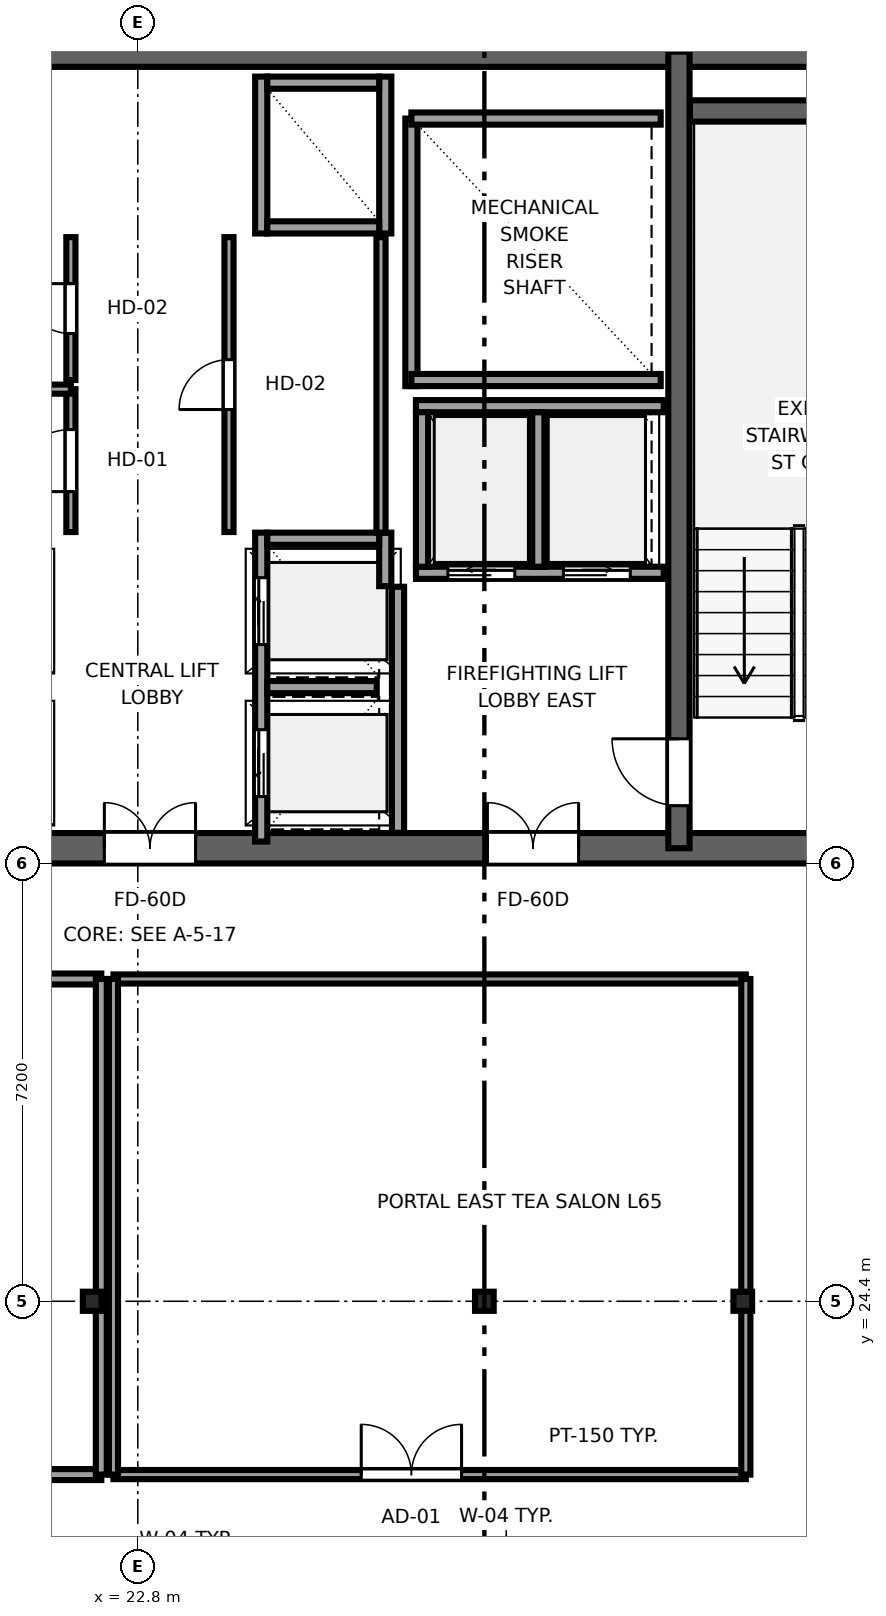
"""IFC4 building model, lengths in metres.
Left out: names, types, materials, properties, quantities, classifications, styles, units other than length and angle.
Written with IfcOpenShell. Run it as: python <this file> out.ifc"""

import sys

from ifc_helpers import new_model, si_unit, direction, frame, frame_2d, origin, origin_2d, place, context, subcontext, project, spatial, rectangle, i_section, extrude, source, transform, mapped, element, fill, save


model = new_model("IFC4")
c1 = context("Model", 3, precision=1e-05, world=origin(), true_north=direction((0.0, 1.0)))
c2 = subcontext(c1, "Body", "Model", "MODEL_VIEW")
j1 = project(units=[si_unit("LENGTHUNIT", "METRE"), si_unit("PLANEANGLEUNIT", "RADIAN")], contexts=[c1])
p1 = place(None, origin())
s1 = spatial("IfcSite", under=j1, at=p1, CompositionType="ELEMENT")
p2 = place(p1, origin())
s2 = spatial("IfcBuilding", under=s1, at=p2, CompositionType="ELEMENT")
p3 = place(p2, frame((0.0, 0.0, 245.2)))
s3 = spatial("IfcBuildingStorey", under=s2, at=p3, CompositionType="ELEMENT", Elevation=245.2)
p4 = place(p3, frame((10.0, 31.85, 0.0), z_axis=(0.0, 0.0, 1.0), x_axis=(1.0, 0.0, 0.0)))
e1 = element("IfcWall", 1, at=p4, inside=s3, PredefinedType="SHEAR", context=c2, shape_type="SweptSolid", body=[
    extrude(rectangle(XDim=26.0, YDim=0.5, at=frame_2d((13.0, 0.0))), origin(), (0.0, 0.0, 1.0), 3.55),
])
p5 = place(p4, frame((7.45, 0.0, 0.0), z_axis=(0.0, 0.0, 1.0), x_axis=(-1.0, 0.0, 0.0)))
e2 = element("IfcOpeningElement", 2, at=p5, cuts=e1, PredefinedType="OPENING", context=c2, shape_type="SweptSolid", body=[
    extrude(rectangle(XDim=1.5, YDim=2.04, at=frame_2d((0.75, 1.02))), frame((0.0, 0.26, 0.0), z_axis=(0.0, -1.0, 0.0), x_axis=(1.0, 0.0, 0.0)), (0.0, 0.0, 1.0), 0.52),
])
p6 = place(p4, frame((13.75, 0.0, 0.0), z_axis=(0.0, 0.0, 1.0), x_axis=(-1.0, 0.0, 0.0)))
e3 = element("IfcOpeningElement", 3, at=p6, cuts=e1, PredefinedType="OPENING", context=c2, shape_type="SweptSolid", body=[
    extrude(rectangle(XDim=1.5, YDim=2.04, at=frame_2d((0.75, 1.02))), frame((0.0, 0.26, 0.0), z_axis=(0.0, -1.0, 0.0), x_axis=(1.0, 0.0, 0.0)), (0.0, 0.0, 1.0), 0.52),
])
p7 = place(p4, frame((20.05, 0.0, 0.0), z_axis=(0.0, 0.0, 1.0), x_axis=(-1.0, 0.0, 0.0)))
e4 = element("IfcOpeningElement", 4, at=p7, cuts=e1, PredefinedType="OPENING", context=c2, shape_type="SweptSolid", body=[
    extrude(rectangle(XDim=1.5, YDim=2.04, at=frame_2d((0.75, 1.02))), frame((0.0, 0.26, 0.0), z_axis=(0.0, -1.0, 0.0), x_axis=(1.0, 0.0, 0.0)), (0.0, 0.0, 1.0), 0.52),
])
p8 = place(p3, frame((10.0, 44.95, 0.0), z_axis=(0.0, 0.0, 1.0), x_axis=(1.0, 0.0, 0.0)))
e5 = element("IfcWall", 5, at=p8, inside=s3, PredefinedType="SHEAR", context=c2, shape_type="SweptSolid", body=[
    extrude(rectangle(XDim=26.0, YDim=0.5, at=frame_2d((13.0, 0.0))), origin(), (0.0, 0.0, 1.0), 3.55),
])
p9 = place(p3, frame((31.7, 31.85, 0.0), z_axis=(0.0, 0.0, 1.0), x_axis=(0.0, 1.0, 0.0)))
e6 = element("IfcWall", 6, at=p9, inside=s3, PredefinedType="SHEAR", context=c2, shape_type="SweptSolid", body=[
    extrude(rectangle(XDim=13.1, YDim=0.35, at=frame_2d((6.55, 0.0))), origin(), (0.0, 0.0, 1.0), 3.55),
])
p10 = place(p9, frame((1.8, 0.0, 0.0), z_axis=(0.0, 0.0, 1.0), x_axis=(-1.0, 0.0, 0.0)))
e7 = element("IfcOpeningElement", 7, at=p10, cuts=e6, PredefinedType="OPENING", context=c2, shape_type="SweptSolid", body=[
    extrude(rectangle(XDim=1.1, YDim=2.12, at=frame_2d((0.55, 1.06))), frame((0.0, 0.185, 0.0), z_axis=(0.0, -1.0, 0.0), x_axis=(1.0, 0.0, 0.0)), (0.0, 0.0, 1.0), 0.37),
])
p11 = place(p3, frame((31.88, 43.975, 0.0), z_axis=(0.0, 0.0, 1.0), x_axis=(1.0, 0.0, 0.0)))
e8 = element("IfcWall", 8, at=p11, inside=s3, PredefinedType="SHEAR", context=c2, shape_type="SweptSolid", body=[
    extrude(rectangle(XDim=3.6, YDim=0.35, at=frame_2d((1.8, 0.0))), origin(), (0.0, 0.0, 1.0), 3.55),
])
m1 = source(origin(), c2, "Body", "SweptSolid", [
    extrude(i_section(OverallWidth=0.307, OverallDepth=0.315, WebThickness=0.012, FlangeThickness=0.019, FilletRadius=0.017, at=origin_2d()), origin(), (0.0, 0.0, 1.0), 3.55),
])
for number, where, z_axis, x_axis in (
    (9, (22.05, 24.4, 0.0), (0.0, 0.0, 1.0), (1.0, 0.0, 0.0)),
    (10, (28.5, 24.4, 0.0), (0.0, 0.0, 1.0), (1.0, 0.0, 0.0)),
    (11, (32.75, 24.4, 0.0), (0.0, 0.0, 1.0), (1.0, 0.0, 0.0)),
):
    element("IfcColumn", number, at=place(p3, frame(where, z_axis=z_axis, x_axis=x_axis)), inside=s3, PredefinedType="COLUMN", context=c2, shape_type="MappedRepresentation", body=[
        mapped(m1, transform((0.0, 0.0, 0.0), x_axis=(1.0, 0.0, 0.0), y_axis=(0.0, 1.0, 0.0), z_axis=(0.0, 0.0, 1.0), scale=1.0)),
    ])
p12 = place(p3, frame((27.3, 39.45, 0.0), z_axis=(0.0, 0.0, 1.0), x_axis=(0.0, 1.0, 0.0)))
e12 = element("IfcWall", 12, at=p12, inside=s3, PredefinedType="SOLIDWALL", context=c2, shape_type="SweptSolid", body=[
    extrude(rectangle(XDim=4.4, YDim=0.2, at=frame_2d((2.2, 0.0))), origin(), (0.0, 0.0, 1.0), 3.37),
])
for number, where, z_axis, x_axis in (
    (13, (27.3, 39.55, 0.0), (0.0, 0.0, 1.0), (1.0, 0.0, 0.0)),
    (14, (27.3, 43.85, 0.0), (0.0, 0.0, 1.0), (1.0, 0.0, 0.0)),
):
    element("IfcWall", number, at=place(p3, frame(where, z_axis=z_axis, x_axis=x_axis)), inside=s3, PredefinedType="SOLIDWALL", context=c2, shape_type="SweptSolid", body=[
        extrude(rectangle(XDim=4.1, YDim=0.2, at=frame_2d((2.05, 0.0))), origin(), (0.0, 0.0, 1.0), 3.37),
    ])
p13 = place(p3, frame((27.08, 32.104, 0.0), z_axis=(0.0, 0.0, 1.0), x_axis=(0.0, 1.0, 0.0)))
e15 = element("IfcWall", 15, at=p13, inside=s3, PredefinedType="SOLIDWALL", context=c2, shape_type="SweptSolid", body=[
    extrude(rectangle(XDim=4.046, YDim=0.2, at=frame_2d((2.023, 0.0))), origin(), (0.0, 0.0, 1.0), 3.37),
])
p14 = place(p3, frame((27.375, 36.38, 0.0), z_axis=(0.0, 0.0, 1.0), x_axis=(1.0, 0.0, 0.0)))
e16 = element("IfcWall", 16, at=p14, inside=s3, PredefinedType="SOLIDWALL", context=c2, shape_type="SweptSolid", body=[
    extrude(rectangle(XDim=4.075, YDim=0.2, at=frame_2d((2.038, 0.0))), origin(), (0.0, 0.0, 1.0), 3.37),
])
p15 = place(p14, frame((0.525, 0.0, 0.0)))
e17 = element("IfcOpeningElement", 17, at=p15, cuts=e16, PredefinedType="OPENING", context=c2, shape_type="SweptSolid", body=[
    extrude(rectangle(XDim=1.1, YDim=2.12, at=frame_2d((0.55, 1.06))), frame((0.0, 0.11, 0.0), z_axis=(0.0, -1.0, 0.0), x_axis=(1.0, 0.0, 0.0)), (0.0, 0.0, 1.0), 0.22),
])
p16 = place(p14, frame((2.425, 0.0, 0.0)))
e18 = element("IfcOpeningElement", 18, at=p16, cuts=e16, PredefinedType="OPENING", context=c2, shape_type="SweptSolid", body=[
    extrude(rectangle(XDim=1.1, YDim=2.12, at=frame_2d((0.55, 1.06))), frame((0.0, 0.11, 0.0), z_axis=(0.0, -1.0, 0.0), x_axis=(1.0, 0.0, 0.0)), (0.0, 0.0, 1.0), 0.22),
])
p17 = place(p3, frame((27.375, 39.12, 0.0), z_axis=(0.0, 0.0, 1.0), x_axis=(1.0, 0.0, 0.0)))
e19 = element("IfcWall", 19, at=p17, inside=s3, PredefinedType="SOLIDWALL", context=c2, shape_type="SweptSolid", body=[
    extrude(rectangle(XDim=4.075, YDim=0.2, at=frame_2d((2.038, 0.0))), origin(), (0.0, 0.0, 1.0), 3.37),
])
for number, where, z_axis, x_axis in (
    (20, (27.475, 36.48, 0.0), (0.0, 0.0, 1.0), (0.0, 1.0, 0.0)),
    (21, (29.387, 36.48, 0.0), (0.0, 0.0, 1.0), (0.0, 1.0, 0.0)),
):
    element("IfcWall", number, at=place(p3, frame(where, z_axis=z_axis, x_axis=x_axis)), inside=s3, PredefinedType="SOLIDWALL", context=c2, shape_type="SweptSolid", body=[
        extrude(rectangle(XDim=2.54, YDim=0.2, at=frame_2d((1.27, 0.0))), origin(), (0.0, 0.0, 1.0), 3.37),
    ])
p18 = place(p3, frame((24.83, 31.96, 0.0), z_axis=(0.0, 0.0, 1.0), x_axis=(0.0, 1.0, 0.0)))
e22 = element("IfcWall", 22, at=p18, inside=s3, PredefinedType="SOLIDWALL", context=c2, shape_type="SweptSolid", body=[
    extrude(rectangle(XDim=5.08, YDim=0.2, at=frame_2d((2.54, 0.0))), origin(), (0.0, 0.0, 1.0), 3.37),
])
p19 = place(p18, frame((0.74, 0.0, 0.0)))
e23 = element("IfcOpeningElement", 23, at=p19, cuts=e22, PredefinedType="OPENING", context=c2, shape_type="SweptSolid", body=[
    extrude(rectangle(XDim=1.1, YDim=2.12, at=frame_2d((0.55, 1.06))), frame((0.0, 0.11, 0.0), z_axis=(0.0, -1.0, 0.0), x_axis=(1.0, 0.0, 0.0)), (0.0, 0.0, 1.0), 0.22),
])
p20 = place(p18, frame((3.24, 0.0, 0.0)))
e24 = element("IfcOpeningElement", 24, at=p20, cuts=e22, PredefinedType="OPENING", context=c2, shape_type="SweptSolid", body=[
    extrude(rectangle(XDim=1.1, YDim=2.12, at=frame_2d((0.55, 1.06))), frame((0.0, 0.11, 0.0), z_axis=(0.0, -1.0, 0.0), x_axis=(1.0, 0.0, 0.0)), (0.0, 0.0, 1.0), 0.22),
])
p21 = place(p3, frame((26.87, 36.16, 0.0), z_axis=(0.0, 0.0, 1.0), x_axis=(0.0, 1.0, 0.0)))
e25 = element("IfcWall", 25, at=p21, inside=s3, PredefinedType="SOLIDWALL", context=c2, shape_type="SweptSolid", body=[
    extrude(rectangle(XDim=0.88, YDim=0.2, at=frame_2d((0.44, 0.0))), origin(), (0.0, 0.0, 1.0), 3.37),
])
p22 = place(p3, frame((24.93, 36.94, 0.0), z_axis=(0.0, 0.0, 1.0), x_axis=(1.0, 0.0, 0.0)))
e26 = element("IfcWall", 26, at=p22, inside=s3, PredefinedType="SOLIDWALL", context=c2, shape_type="SweptSolid", body=[
    extrude(rectangle(XDim=1.84, YDim=0.2, at=frame_2d((0.92, 0.0))), origin(), (0.0, 0.0, 1.0), 3.37),
])
p23 = place(p3, frame((24.93, 34.5, 0.0), z_axis=(0.0, 0.0, 1.0), x_axis=(1.0, 0.0, 0.0)))
e27 = element("IfcWall", 27, at=p23, inside=s3, PredefinedType="SOLIDWALL", context=c2, shape_type="SweptSolid", body=[
    extrude(rectangle(XDim=1.8, YDim=0.2, at=frame_2d((0.9, 0.0))), origin(), (0.0, 0.0, 1.0), 3.37),
])
for number, where, z_axis, x_axis in (
    (28, (24.83, 41.96, 0.0), (0.0, 0.0, 1.0), (0.0, 1.0, 0.0)),
    (29, (26.87, 41.96, 0.0), (0.0, 0.0, 1.0), (0.0, 1.0, 0.0)),
):
    element("IfcWall", number, at=place(p3, frame(where, z_axis=z_axis, x_axis=x_axis)), inside=s3, PredefinedType="SOLIDWALL", context=c2, shape_type="SweptSolid", body=[
        extrude(rectangle(XDim=2.58, YDim=0.2, at=frame_2d((1.29, 0.0))), origin(), (0.0, 0.0, 1.0), 3.37),
    ])
for number, where, z_axis, x_axis in (
    (30, (24.93, 42.06, 0.0), (0.0, 0.0, 1.0), (1.0, 0.0, 0.0)),
    (31, (24.93, 44.44, 0.0), (0.0, 0.0, 1.0), (1.0, 0.0, 0.0)),
):
    element("IfcWall", number, at=place(p3, frame(where, z_axis=z_axis, x_axis=x_axis)), inside=s3, PredefinedType="SOLIDWALL", context=c2, shape_type="SweptSolid", body=[
        extrude(rectangle(XDim=1.84, YDim=0.2, at=frame_2d((0.92, 0.0))), origin(), (0.0, 0.0, 1.0), 3.37),
    ])
p24 = place(p3, frame((21.7, 37.05, 0.0), z_axis=(0.0, 0.0, 1.0), x_axis=(0.0, 1.0, 0.0)))
e32 = element("IfcWall", 32, at=p24, inside=s3, PredefinedType="PARTITIONING", context=c2, shape_type="SweptSolid", body=[
    extrude(rectangle(XDim=2.35, YDim=0.15, at=frame_2d((1.175, 0.0))), origin(), (0.0, 0.0, 1.0), 3.37),
])
p25 = place(p24, frame((0.665, 0.0, 0.0)))
e33 = element("IfcOpeningElement", 33, at=p25, cuts=e32, PredefinedType="OPENING", context=c2, shape_type="SweptSolid", body=[
    extrude(rectangle(XDim=1.02, YDim=2.03, at=frame_2d((0.51, 1.015))), frame((0.0, 0.085, 0.0), z_axis=(0.0, -1.0, 0.0), x_axis=(1.0, 0.0, 0.0)), (0.0, 0.0, 1.0), 0.17),
])
p26 = place(p3, frame((19.2, 39.4, 0.0), z_axis=(0.0, 0.0, 1.0), x_axis=(1.0, 0.0, 0.0)))
e34 = element("IfcWall", 34, at=p26, inside=s3, PredefinedType="PARTITIONING", context=c2, shape_type="SweptSolid", body=[
    extrude(rectangle(XDim=2.5, YDim=0.15, at=frame_2d((1.25, 0.0))), origin(), (0.0, 0.0, 1.0), 3.37),
])
p27 = place(p3, frame((21.7, 39.55, 0.0), z_axis=(0.0, 0.0, 1.0), x_axis=(0.0, 1.0, 0.0)))
e35 = element("IfcWall", 35, at=p27, inside=s3, PredefinedType="PARTITIONING", context=c2, shape_type="SweptSolid", body=[
    extrude(rectangle(XDim=2.35, YDim=0.15, at=frame_2d((1.175, 0.0))), origin(), (0.0, 0.0, 1.0), 3.37),
])
p28 = place(p27, frame((0.765, 0.0, 0.0)))
e36 = element("IfcOpeningElement", 36, at=p28, cuts=e35, PredefinedType="OPENING", context=c2, shape_type="SweptSolid", body=[
    extrude(rectangle(XDim=0.82, YDim=2.01, at=frame_2d((0.41, 1.005))), frame((0.0, 0.085, 0.0), z_axis=(0.0, -1.0, 0.0), x_axis=(1.0, 0.0, 0.0)), (0.0, 0.0, 1.0), 0.17),
])
p29 = place(p3, frame((24.3, 37.05, 0.0), z_axis=(0.0, 0.0, 1.0), x_axis=(0.0, 1.0, 0.0)))
e37 = element("IfcWall", 37, at=p29, inside=s3, PredefinedType="PARTITIONING", context=c2, shape_type="SweptSolid", body=[
    extrude(rectangle(XDim=4.85, YDim=0.15, at=frame_2d((2.425, 0.0))), origin(), (0.0, 0.0, 1.0), 3.37),
])
p30 = place(p29, frame((2.015, 0.0, 0.0)))
e38 = element("IfcOpeningElement", 38, at=p30, cuts=e37, PredefinedType="OPENING", context=c2, shape_type="SweptSolid", body=[
    extrude(rectangle(XDim=0.82, YDim=2.01, at=frame_2d((0.41, 1.005))), frame((0.0, 0.085, 0.0), z_axis=(0.0, -1.0, 0.0), x_axis=(1.0, 0.0, 0.0)), (0.0, 0.0, 1.0), 0.17),
])
p31 = place(p3, frame((26.8, 37.04, 0.0), z_axis=(0.0, 0.0, 1.0), x_axis=(0.0, 1.0, 0.0)))
e39 = element("IfcWall", 39, at=p31, inside=s3, PredefinedType="PARTITIONING", context=c2, shape_type="SweptSolid", body=[
    extrude(rectangle(XDim=4.86, YDim=0.15, at=frame_2d((2.43, 0.0))), origin(), (0.0, 0.0, 1.0), 3.37),
])
p32 = place(p3, frame((11.9, 21.55, 0.0), z_axis=(0.0, 0.0, 1.0), x_axis=(1.0, 0.0, 0.0)))
e40 = element("IfcWall", 40, at=p32, inside=s3, PredefinedType="PARTITIONING", context=c2, shape_type="SweptSolid", body=[
    extrude(rectangle(XDim=10.3, YDim=0.18, at=frame_2d((5.15, 0.0))), origin(), (0.0, 0.0, 1.0), 3.37),
])
p33 = place(p32, frame((4.325, 0.0, 0.0)))
e41 = element("IfcOpeningElement", 41, at=p33, cuts=e40, PredefinedType="OPENING", context=c2, shape_type="SweptSolid", body=[
    extrude(rectangle(XDim=1.65, YDim=2.15, at=frame_2d((0.825, 1.075))), frame((0.0, 0.1, 0.0), z_axis=(0.0, -1.0, 0.0), x_axis=(1.0, 0.0, 0.0)), (0.0, 0.0, 1.0), 0.2),
])
p34 = place(p3, frame((11.9, 29.7, 0.0), z_axis=(0.0, 0.0, 1.0), x_axis=(1.0, 0.0, 0.0)))
e42 = element("IfcWall", 42, at=p34, inside=s3, PredefinedType="PARTITIONING", context=c2, shape_type="SweptSolid", body=[
    extrude(rectangle(XDim=10.3, YDim=0.18, at=frame_2d((5.15, 0.0))), origin(), (0.0, 0.0, 1.0), 3.37),
])
p35 = place(p3, frame((22.2, 21.55, 0.0), z_axis=(0.0, 0.0, 1.0), x_axis=(0.0, 1.0, 0.0)))
e43 = element("IfcWall", 43, at=p35, inside=s3, PredefinedType="PARTITIONING", context=c2, shape_type="SweptSolid", body=[
    extrude(rectangle(XDim=8.15, YDim=0.18, at=frame_2d((4.075, 0.0))), origin(), (0.0, 0.0, 1.0), 2.827),
])
p36 = place(p3, frame((22.4, 21.55, 0.0), z_axis=(0.0, 0.0, 1.0), x_axis=(1.0, 0.0, 0.0)))
e44 = element("IfcWall", 44, at=p36, inside=s3, PredefinedType="PARTITIONING", context=c2, shape_type="SweptSolid", body=[
    extrude(rectangle(XDim=10.4, YDim=0.15, at=frame_2d((5.2, 0.0))), origin(), (0.0, 0.0, 1.0), 3.37),
])
p37 = place(p36, frame((4.075, 0.0, 0.0)))
e45 = element("IfcOpeningElement", 45, at=p37, cuts=e44, PredefinedType="OPENING", context=c2, shape_type="SweptSolid", body=[
    extrude(rectangle(XDim=1.65, YDim=2.15, at=frame_2d((0.825, 1.075))), frame((0.0, 0.085, 0.0), z_axis=(0.0, -1.0, 0.0), x_axis=(1.0, 0.0, 0.0)), (0.0, 0.0, 1.0), 0.17),
])
p38 = place(p3, frame((22.4, 29.7, 0.0), z_axis=(0.0, 0.0, 1.0), x_axis=(1.0, 0.0, 0.0)))
e46 = element("IfcWall", 46, at=p38, inside=s3, PredefinedType="PARTITIONING", context=c2, shape_type="SweptSolid", body=[
    extrude(rectangle(XDim=10.4, YDim=0.15, at=frame_2d((5.2, 0.0))), origin(), (0.0, 0.0, 1.0), 3.37),
])
p39 = place(p3, frame((22.4, 21.55, 0.0), z_axis=(0.0, 0.0, 1.0), x_axis=(0.0, 1.0, 0.0)))
e47 = element("IfcWall", 47, at=p39, inside=s3, PredefinedType="PARTITIONING", context=c2, shape_type="SweptSolid", body=[
    extrude(rectangle(XDim=8.15, YDim=0.15, at=frame_2d((4.075, 0.0))), origin(), (0.0, 0.0, 1.0), 3.37),
])
p40 = place(p3, frame((32.8, 21.55, 0.0), z_axis=(0.0, 0.0, 1.0), x_axis=(0.0, 1.0, 0.0)))
e48 = element("IfcWall", 48, at=p40, inside=s3, PredefinedType="PARTITIONING", context=c2, shape_type="SweptSolid", body=[
    extrude(rectangle(XDim=8.15, YDim=0.15, at=frame_2d((4.075, 0.0))), origin(), (0.0, 0.0, 1.0), 2.827),
])
m2 = source(origin(), c2, "Body", "SweptSolid", [
    extrude(rectangle(XDim=1.1, YDim=2.12, at=frame_2d((0.55, 1.06))), frame((0.0, 0.025, 0.0), z_axis=(0.0, -1.0, 0.0), x_axis=(1.0, 0.0, 0.0)), (0.0, 0.0, 1.0), 0.05),
])
p41 = place(p10, origin())
e49 = element("IfcDoor", 49, at=p41, inside=s3, OperationType="SINGLE_SWING_RIGHT", PredefinedType="DOOR", context=c2, shape_type="MappedRepresentation", body=[
    mapped(m2, transform((0.0, 0.0, 0.0), x_axis=(1.0, 0.0, 0.0), y_axis=(0.0, 1.0, 0.0), z_axis=(0.0, 0.0, 1.0), scale=1.0)),
])
fill(e7, e49)
m3 = source(origin(), c2, "Body", "SweptSolid", [
    extrude(rectangle(XDim=1.5, YDim=2.04, at=frame_2d((0.75, 1.02))), frame((0.0, 0.025, 0.0), z_axis=(0.0, -1.0, 0.0), x_axis=(1.0, 0.0, 0.0)), (0.0, 0.0, 1.0), 0.05),
])
p42 = place(p6, origin())
e50 = element("IfcDoor", 50, at=p42, inside=s3, OperationType="DOUBLE_DOOR_SINGLE_SWING", PredefinedType="DOOR", context=c2, shape_type="MappedRepresentation", body=[
    mapped(m3, transform((0.0, 0.0, 0.0), x_axis=(1.0, 0.0, 0.0), y_axis=(0.0, 1.0, 0.0), z_axis=(0.0, 0.0, 1.0), scale=1.0)),
])
fill(e3, e50)
p43 = place(p7, origin())
e51 = element("IfcDoor", 51, at=p43, inside=s3, OperationType="DOUBLE_DOOR_SINGLE_SWING", PredefinedType="DOOR", context=c2, shape_type="MappedRepresentation", body=[
    mapped(m3, transform((0.0, 0.0, 0.0), x_axis=(1.0, 0.0, 0.0), y_axis=(0.0, 1.0, 0.0), z_axis=(0.0, 0.0, 1.0), scale=1.0)),
])
fill(e4, e51)
m4 = source(origin(), c2, "Body", "SweptSolid", [
    extrude(rectangle(XDim=1.1, YDim=2.12, at=frame_2d((0.55, 1.06))), frame((0.0, 0.025, 0.0), z_axis=(0.0, -1.0, 0.0), x_axis=(1.0, 0.0, 0.0)), (0.0, 0.0, 1.0), 0.05),
])
p44 = place(p15, origin())
e52 = element("IfcDoor", 52, at=p44, inside=s3, OperationType="SLIDING_TO_LEFT", PredefinedType="DOOR", context=c2, shape_type="MappedRepresentation", body=[
    mapped(m4, transform((0.0, 0.0, 0.0), x_axis=(1.0, 0.0, 0.0), y_axis=(0.0, 1.0, 0.0), z_axis=(0.0, 0.0, 1.0), scale=1.0)),
])
fill(e17, e52)
p45 = place(p16, origin())
e53 = element("IfcDoor", 53, at=p45, inside=s3, OperationType="SLIDING_TO_RIGHT", PredefinedType="DOOR", context=c2, shape_type="MappedRepresentation", body=[
    mapped(m4, transform((0.0, 0.0, 0.0), x_axis=(1.0, 0.0, 0.0), y_axis=(0.0, 1.0, 0.0), z_axis=(0.0, 0.0, 1.0), scale=1.0)),
])
fill(e18, e53)
p46 = place(p19, origin())
e54 = element("IfcDoor", 54, at=p46, inside=s3, OperationType="SLIDING_TO_LEFT", PredefinedType="DOOR", context=c2, shape_type="MappedRepresentation", body=[
    mapped(m4, transform((0.0, 0.0, 0.0), x_axis=(1.0, 0.0, 0.0), y_axis=(0.0, 1.0, 0.0), z_axis=(0.0, 0.0, 1.0), scale=1.0)),
])
fill(e23, e54)
p47 = place(p20, origin())
e55 = element("IfcDoor", 55, at=p47, inside=s3, OperationType="SLIDING_TO_RIGHT", PredefinedType="DOOR", context=c2, shape_type="MappedRepresentation", body=[
    mapped(m4, transform((0.0, 0.0, 0.0), x_axis=(1.0, 0.0, 0.0), y_axis=(0.0, 1.0, 0.0), z_axis=(0.0, 0.0, 1.0), scale=1.0)),
])
fill(e24, e55)
m5 = source(origin(), c2, "Body", "SweptSolid", [
    extrude(rectangle(XDim=1.02, YDim=2.03, at=frame_2d((0.51, 1.015))), frame((0.0, 0.025, 0.0), z_axis=(0.0, -1.0, 0.0), x_axis=(1.0, 0.0, 0.0)), (0.0, 0.0, 1.0), 0.05),
])
p48 = place(p25, origin())
e56 = element("IfcDoor", 56, at=p48, inside=s3, OperationType="SINGLE_SWING_LEFT", PredefinedType="DOOR", context=c2, shape_type="MappedRepresentation", body=[
    mapped(m5, transform((0.0, 0.0, 0.0), x_axis=(1.0, 0.0, 0.0), y_axis=(0.0, 1.0, 0.0), z_axis=(0.0, 0.0, 1.0), scale=1.0)),
])
fill(e33, e56)
m6 = source(origin(), c2, "Body", "SweptSolid", [
    extrude(rectangle(XDim=0.82, YDim=2.01, at=frame_2d((0.41, 1.005))), frame((0.0, 0.025, 0.0), z_axis=(0.0, -1.0, 0.0), x_axis=(1.0, 0.0, 0.0)), (0.0, 0.0, 1.0), 0.05),
])
p49 = place(p28, origin())
e57 = element("IfcDoor", 57, at=p49, inside=s3, OperationType="SINGLE_SWING_RIGHT", PredefinedType="DOOR", context=c2, shape_type="MappedRepresentation", body=[
    mapped(m6, transform((0.0, 0.0, 0.0), x_axis=(1.0, 0.0, 0.0), y_axis=(0.0, 1.0, 0.0), z_axis=(0.0, 0.0, 1.0), scale=1.0)),
])
fill(e36, e57)
p50 = place(p30, origin())
e58 = element("IfcDoor", 58, at=p50, inside=s3, OperationType="SINGLE_SWING_LEFT", PredefinedType="DOOR", context=c2, shape_type="MappedRepresentation", body=[
    mapped(m6, transform((0.0, 0.0, 0.0), x_axis=(1.0, 0.0, 0.0), y_axis=(0.0, 1.0, 0.0), z_axis=(0.0, 0.0, 1.0), scale=1.0)),
])
fill(e38, e58)
m7 = source(origin(), c2, "Body", "SweptSolid", [
    extrude(rectangle(XDim=1.65, YDim=2.15, at=frame_2d((0.825, 1.075))), frame((0.0, 0.025, 0.0), z_axis=(0.0, -1.0, 0.0), x_axis=(1.0, 0.0, 0.0)), (0.0, 0.0, 1.0), 0.05),
])
p51 = place(p37, origin())
e59 = element("IfcDoor", 59, at=p51, inside=s3, OperationType="DOUBLE_DOOR_SINGLE_SWING", PredefinedType="DOOR", context=c2, shape_type="MappedRepresentation", body=[
    mapped(m7, transform((0.0, 0.0, 0.0), x_axis=(1.0, 0.0, 0.0), y_axis=(0.0, 1.0, 0.0), z_axis=(0.0, 0.0, 1.0), scale=1.0)),
])
fill(e45, e59)
save(model, sys.argv[1])
